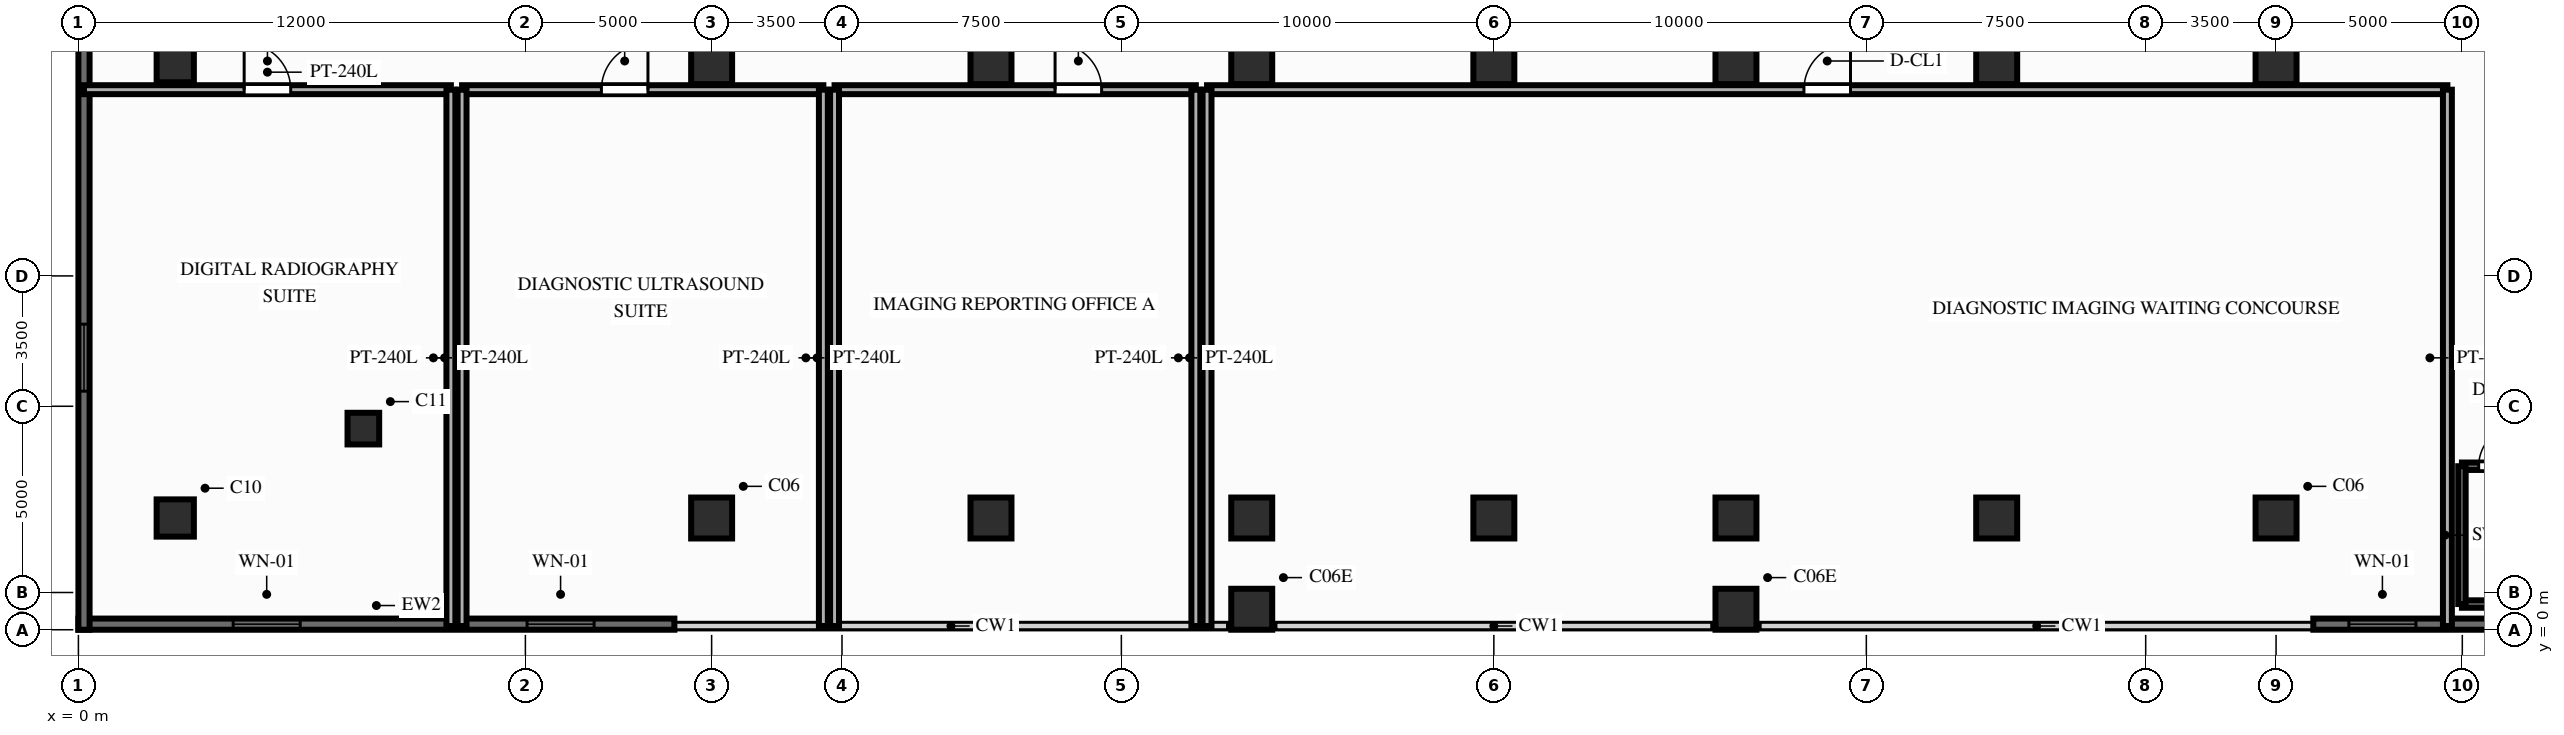
"""IFC4 building model, lengths in metres.
Left out: names, types, materials, properties, quantities, classifications, styles, units other than length and angle.
Written with IfcOpenShell. Run it as: python <this file> out.ifc"""

import sys

from ifc_helpers import new_model, si_unit, direction, frame, frame_2d, origin, origin_2d, place, context, subcontext, project, spatial, rectangle, circle, extrude, source, transform, mapped, element, fill, save


model = new_model("IFC4")
c1 = context("Model", 3, precision=1e-05, world=origin(), true_north=direction((0.0, 1.0)))
c2 = subcontext(c1, "Body", "Model", "MODEL_VIEW")
j1 = project(units=[si_unit("LENGTHUNIT", "METRE"), si_unit("PLANEANGLEUNIT", "RADIAN")], contexts=[c1])
p1 = place(None, origin())
s1 = spatial("IfcSite", under=j1, at=p1, CompositionType="ELEMENT")
p2 = place(p1, origin())
s2 = spatial("IfcBuilding", under=s1, at=p2, CompositionType="ELEMENT")
p3 = place(p2, frame((0.0, 0.0, 7.8)))
s3 = spatial("IfcBuildingStorey", under=s2, at=p3, CompositionType="ELEMENT", Elevation=7.8)
m1 = source(origin(), c2, "Body", "SweptSolid", [
    extrude(circle(Radius=0.5, at=origin_2d()), origin(), (0.0, 0.0, 1.0), 3.6),
])
for number, where, z_axis, x_axis in (
    (1, (2.6, 3.0, 0.0), (0.0, 0.0, 1.0), (1.0, 0.0, 0.0)),
    (2, (2.6, 15.2, 0.0), (0.0, 0.0, 1.0), (1.0, 0.0, 0.0)),
):
    element("IfcColumn", number, at=place(p3, frame(where, z_axis=z_axis, x_axis=x_axis)), inside=s3, PredefinedType="COLUMN", context=c2, shape_type="MappedRepresentation", body=[
        mapped(m1, transform((0.0, 0.0, 0.0), scale=1.0)),
    ])
m2 = source(origin(), c2, "Body", "SweptSolid", [
    extrude(circle(Radius=0.425, at=origin_2d()), origin(), (0.0, 0.0, 1.0), 3.6),
])
p4 = place(p3, frame((7.65, 5.4, 0.0), z_axis=(0.0, 0.0, 1.0), x_axis=(1.0, 0.0, 0.0)))
e3 = element("IfcColumn", 3, at=p4, inside=s3, PredefinedType="COLUMN", context=c2, shape_type="MappedRepresentation", body=[
    mapped(m2, transform((0.0, 0.0, 0.0), scale=1.0)),
])
m3 = source(origin(), c2, "Body", "SweptSolid", [
    extrude(rectangle(XDim=1.1, YDim=1.1, at=origin_2d()), origin(), (0.0, 0.0, 1.0), 3.6),
])
for number, where, z_axis, x_axis in (
    (4, (17.0, 3.0, 0.0), (0.0, 0.0, 1.0), (1.0, 0.0, 0.0)),
    (5, (59.0, 3.0, 0.0), (0.0, 0.0, 1.0), (1.0, 0.0, 0.0)),
    (6, (17.0, 15.2, 0.0), (0.0, 0.0, 1.0), (1.0, 0.0, 0.0)),
    (7, (59.0, 15.2, 0.0), (0.0, 0.0, 1.0), (1.0, 0.0, 0.0)),
    (8, (24.5, 3.0, 0.0), (0.0, 0.0, 1.0), (1.0, 0.0, 0.0)),
    (9, (24.5, 15.2, 0.0), (0.0, 0.0, 1.0), (1.0, 0.0, 0.0)),
    (10, (31.5, 0.55, 0.0), (0.0, 0.0, 1.0), (1.0, 0.0, 0.0)),
    (11, (31.5, 3.0, 0.0), (0.0, 0.0, 1.0), (1.0, 0.0, 0.0)),
    (12, (31.5, 15.2, 0.0), (0.0, 0.0, 1.0), (1.0, 0.0, 0.0)),
    (13, (38.0, 3.0, 0.0), (0.0, 0.0, 1.0), (1.0, 0.0, 0.0)),
    (14, (38.0, 15.2, 0.0), (0.0, 0.0, 1.0), (1.0, 0.0, 0.0)),
    (15, (44.5, 0.55, 0.0), (0.0, 0.0, 1.0), (1.0, 0.0, 0.0)),
    (16, (44.5, 3.0, 0.0), (0.0, 0.0, 1.0), (1.0, 0.0, 0.0)),
    (17, (44.5, 15.2, 0.0), (0.0, 0.0, 1.0), (1.0, 0.0, 0.0)),
    (18, (51.5, 3.0, 0.0), (0.0, 0.0, 1.0), (1.0, 0.0, 0.0)),
    (19, (51.5, 15.2, 0.0), (0.0, 0.0, 1.0), (1.0, 0.0, 0.0)),
):
    element("IfcColumn", number, at=place(p3, frame(where, z_axis=z_axis, x_axis=x_axis)), inside=s3, PredefinedType="COLUMN", context=c2, shape_type="MappedRepresentation", body=[
        mapped(m3, transform((0.0, 0.0, 0.0), scale=1.0)),
    ])
p5 = place(p3, frame((0.0, 0.15, 0.0), z_axis=(0.0, 0.0, 1.0), x_axis=(1.0, 0.0, 0.0)))
e20 = element("IfcWall", 20, at=p5, inside=s3, PredefinedType="SOLIDWALL", context=c2, shape_type="SweptSolid", body=[
    extrude(rectangle(XDim=16.0, YDim=0.3, at=frame_2d((8.0, 0.0))), origin(), (0.0, 0.0, 1.0), 2.88),
])
p6 = place(p5, frame((4.155, 0.0, 0.85)))
e21 = element("IfcOpeningElement", 21, at=p6, cuts=e20, PredefinedType="OPENING", context=c2, shape_type="SweptSolid", body=[
    extrude(rectangle(XDim=1.8, YDim=1.65, at=frame_2d((0.9, 0.825))), frame((0.0, 0.162, 0.0), z_axis=(0.0, -1.0, 0.0), x_axis=(1.0, 0.0, 0.0)), (0.0, 0.0, 1.0), 0.324),
])
p7 = place(p5, frame((12.045, 0.0, 0.85)))
e22 = element("IfcOpeningElement", 22, at=p7, cuts=e20, PredefinedType="OPENING", context=c2, shape_type="SweptSolid", body=[
    extrude(rectangle(XDim=1.8, YDim=1.65, at=frame_2d((0.9, 0.825))), frame((0.0, 0.162, 0.0), z_axis=(0.0, -1.0, 0.0), x_axis=(1.0, 0.0, 0.0)), (0.0, 0.0, 1.0), 0.324),
])
p8 = place(p3, frame((60.0, 0.15, 0.0), z_axis=(0.0, 0.0, 1.0), x_axis=(1.0, 0.0, 0.0)))
e23 = element("IfcWall", 23, at=p8, inside=s3, PredefinedType="SOLIDWALL", context=c2, shape_type="SweptSolid", body=[
    extrude(rectangle(XDim=16.0, YDim=0.3, at=frame_2d((8.0, 0.0))), origin(), (0.0, 0.0, 1.0), 2.88),
])
p9 = place(p8, frame((0.955, 0.0, 0.85)))
e24 = element("IfcOpeningElement", 24, at=p9, cuts=e23, PredefinedType="OPENING", context=c2, shape_type="SweptSolid", body=[
    extrude(rectangle(XDim=1.8, YDim=1.65, at=frame_2d((0.9, 0.825))), frame((0.0, 0.162, 0.0), z_axis=(0.0, -1.0, 0.0), x_axis=(1.0, 0.0, 0.0)), (0.0, 0.0, 1.0), 0.324),
])
p10 = place(p8, frame((6.705, 0.0, 0.85)))
e25 = element("IfcOpeningElement", 25, at=p10, cuts=e23, PredefinedType="OPENING", context=c2, shape_type="SweptSolid", body=[
    extrude(rectangle(XDim=1.8, YDim=1.65, at=frame_2d((0.9, 0.825))), frame((0.0, 0.162, 0.0), z_axis=(0.0, -1.0, 0.0), x_axis=(1.0, 0.0, 0.0)), (0.0, 0.0, 1.0), 0.324),
])
p11 = place(p8, frame((12.85, 0.0, 0.85)))
e26 = element("IfcOpeningElement", 26, at=p11, cuts=e23, PredefinedType="OPENING", context=c2, shape_type="SweptSolid", body=[
    extrude(rectangle(XDim=1.8, YDim=1.65, at=frame_2d((0.9, 0.825))), frame((0.0, 0.162, 0.0), z_axis=(0.0, -1.0, 0.0), x_axis=(1.0, 0.0, 0.0)), (0.0, 0.0, 1.0), 0.324),
])
p12 = place(p3, frame((0.15, 0.0, 0.0), z_axis=(0.0, 0.0, 1.0), x_axis=(0.0, 1.0, 0.0)))
e27 = element("IfcWall", 27, at=p12, inside=s3, PredefinedType="SOLIDWALL", context=c2, shape_type="SweptSolid", body=[
    extrude(rectangle(XDim=54.0, YDim=0.3, at=frame_2d((27.0, 0.0))), origin(), (0.0, 0.0, 1.0), 2.88),
])
p13 = place(p12, frame((6.405, 0.0, 0.85)))
e28 = element("IfcOpeningElement", 28, at=p13, cuts=e27, PredefinedType="OPENING", context=c2, shape_type="SweptSolid", body=[
    extrude(rectangle(XDim=1.8, YDim=1.65, at=frame_2d((0.9, 0.825))), frame((0.0, 0.162, 0.0), z_axis=(0.0, -1.0, 0.0), x_axis=(1.0, 0.0, 0.0)), (0.0, 0.0, 1.0), 0.324),
])
p14 = place(p12, frame((26.045, 0.0, 0.85)))
e29 = element("IfcOpeningElement", 29, at=p14, cuts=e27, PredefinedType="OPENING", context=c2, shape_type="SweptSolid", body=[
    extrude(rectangle(XDim=1.8, YDim=1.65, at=frame_2d((0.9, 0.825))), frame((0.0, 0.162, 0.0), z_axis=(0.0, -1.0, 0.0), x_axis=(1.0, 0.0, 0.0)), (0.0, 0.0, 1.0), 0.324),
])
p15 = place(p3, frame((63.99, 0.69, 0.0), z_axis=(0.0, 0.0, 1.0), x_axis=(1.0, 0.0, 0.0)))
e30 = element("IfcWall", 30, at=p15, inside=s3, PredefinedType="SOLIDWALL", context=c2, shape_type="SweptSolid", body=[
    extrude(rectangle(XDim=7.62, YDim=0.2, at=frame_2d((3.81, 0.0))), origin(), (0.0, 0.0, 1.0), 3.32),
])
p16 = place(p3, frame((63.99, 4.39, 0.0), z_axis=(0.0, 0.0, 1.0), x_axis=(1.0, 0.0, 0.0)))
e31 = element("IfcWall", 31, at=p16, inside=s3, PredefinedType="SOLIDWALL", context=c2, shape_type="SweptSolid", body=[
    extrude(rectangle(XDim=7.62, YDim=0.2, at=frame_2d((3.81, 0.0))), origin(), (0.0, 0.0, 1.0), 3.32),
])
p17 = place(p16, frame((0.45, 0.0, 0.0)))
e32 = element("IfcOpeningElement", 32, at=p17, cuts=e31, PredefinedType="OPENING", context=c2, shape_type="SweptSolid", body=[
    extrude(rectangle(XDim=1.1, YDim=2.15, at=frame_2d((0.55, 1.075))), frame((0.0, 0.112, 0.0), z_axis=(0.0, -1.0, 0.0), x_axis=(1.0, 0.0, 0.0)), (0.0, 0.0, 1.0), 0.224),
])
p18 = place(p3, frame((63.99, 0.69, 0.0), z_axis=(0.0, 0.0, 1.0), x_axis=(0.0, 1.0, 0.0)))
e33 = element("IfcWall", 33, at=p18, inside=s3, PredefinedType="SOLIDWALL", context=c2, shape_type="SweptSolid", body=[
    extrude(rectangle(XDim=3.7, YDim=0.2, at=frame_2d((1.85, 0.0))), origin(), (0.0, 0.0, 1.0), 3.32),
])
p19 = place(p3, frame((0.15, 14.5, 0.0), z_axis=(0.0, 0.0, 1.0), x_axis=(1.0, 0.0, 0.0)))
e34 = element("IfcWall", 34, at=p19, inside=s3, PredefinedType="PARTITIONING", context=c2, shape_type="SweptSolid", body=[
    extrude(rectangle(XDim=9.85, YDim=0.24, at=frame_2d((4.925, 0.0))), origin(), (0.0, 0.0, 1.0), 3.32),
])
p20 = place(p19, frame((4.3, 0.0, 0.0)))
e35 = element("IfcOpeningElement", 35, at=p20, cuts=e34, PredefinedType="OPENING", context=c2, shape_type="SweptSolid", body=[
    extrude(rectangle(XDim=1.25, YDim=2.15, at=frame_2d((0.625, 1.075))), frame((0.0, 0.132, 0.0), z_axis=(0.0, -1.0, 0.0), x_axis=(1.0, 0.0, 0.0)), (0.0, 0.0, 1.0), 0.264),
])
p21 = place(p3, frame((10.0, 0.1, 0.0), z_axis=(0.0, 0.0, 1.0), x_axis=(0.0, 1.0, 0.0)))
e36 = element("IfcWall", 36, at=p21, inside=s3, PredefinedType="PARTITIONING", context=c2, shape_type="SweptSolid", body=[
    extrude(rectangle(XDim=14.4, YDim=0.24, at=frame_2d((7.2, 0.0))), origin(), (0.0, 0.0, 1.0), 3.32),
])
p22 = place(p3, frame((10.3, 14.5, 0.0), z_axis=(0.0, 0.0, 1.0), x_axis=(1.0, 0.0, 0.0)))
e37 = element("IfcWall", 37, at=p22, inside=s3, PredefinedType="PARTITIONING", context=c2, shape_type="SweptSolid", body=[
    extrude(rectangle(XDim=9.7, YDim=0.24, at=frame_2d((4.85, 0.0))), origin(), (0.0, 0.0, 1.0), 3.32),
])
p23 = place(p22, frame((3.74, 0.0, 0.0)))
e38 = element("IfcOpeningElement", 38, at=p23, cuts=e37, PredefinedType="OPENING", context=c2, shape_type="SweptSolid", body=[
    extrude(rectangle(XDim=1.25, YDim=2.15, at=frame_2d((0.625, 1.075))), frame((0.0, 0.132, 0.0), z_axis=(0.0, -1.0, 0.0), x_axis=(1.0, 0.0, 0.0)), (0.0, 0.0, 1.0), 0.264),
])
for number, where, z_axis, x_axis in (
    (39, (10.3, 0.1, 0.0), (0.0, 0.0, 1.0), (0.0, 1.0, 0.0)),
    (40, (20.0, 0.1, 0.0), (0.0, 0.0, 1.0), (0.0, 1.0, 0.0)),
):
    element("IfcWall", number, at=place(p3, frame(where, z_axis=z_axis, x_axis=x_axis)), inside=s3, PredefinedType="PARTITIONING", context=c2, shape_type="SweptSolid", body=[
        extrude(rectangle(XDim=14.4, YDim=0.24, at=frame_2d((7.2, 0.0))), origin(), (0.0, 0.0, 1.0), 3.32),
    ])
p24 = place(p3, frame((20.3, 14.5, 0.0), z_axis=(0.0, 0.0, 1.0), x_axis=(1.0, 0.0, 0.0)))
e41 = element("IfcWall", 41, at=p24, inside=s3, PredefinedType="PARTITIONING", context=c2, shape_type="SweptSolid", body=[
    extrude(rectangle(XDim=9.7, YDim=0.24, at=frame_2d((4.85, 0.0))), origin(), (0.0, 0.0, 1.0), 3.32),
])
p25 = place(p24, frame((5.92, 0.0, 0.0)))
e42 = element("IfcOpeningElement", 42, at=p25, cuts=e41, PredefinedType="OPENING", context=c2, shape_type="SweptSolid", body=[
    extrude(rectangle(XDim=1.25, YDim=2.15, at=frame_2d((0.625, 1.075))), frame((0.0, 0.132, 0.0), z_axis=(0.0, -1.0, 0.0), x_axis=(1.0, 0.0, 0.0)), (0.0, 0.0, 1.0), 0.264),
])
for number, where, z_axis, x_axis in (
    (43, (20.3, 0.1, 0.0), (0.0, 0.0, 1.0), (0.0, 1.0, 0.0)),
    (44, (30.0, 0.1, 0.0), (0.0, 0.0, 1.0), (0.0, 1.0, 0.0)),
):
    element("IfcWall", number, at=place(p3, frame(where, z_axis=z_axis, x_axis=x_axis)), inside=s3, PredefinedType="PARTITIONING", context=c2, shape_type="SweptSolid", body=[
        extrude(rectangle(XDim=14.4, YDim=0.24, at=frame_2d((7.2, 0.0))), origin(), (0.0, 0.0, 1.0), 3.32),
    ])
p26 = place(p3, frame((30.3, 14.5, 0.0), z_axis=(0.0, 0.0, 1.0), x_axis=(1.0, 0.0, 0.0)))
e45 = element("IfcWall", 45, at=p26, inside=s3, PredefinedType="PARTITIONING", context=c2, shape_type="SweptSolid", body=[
    extrude(rectangle(XDim=33.3, YDim=0.24, at=frame_2d((16.65, 0.0))), origin(), (0.0, 0.0, 1.0), 3.32),
])
p27 = place(p26, frame((16.025, 0.0, 0.0)))
e46 = element("IfcOpeningElement", 46, at=p27, cuts=e45, PredefinedType="OPENING", context=c2, shape_type="SweptSolid", body=[
    extrude(rectangle(XDim=1.25, YDim=2.15, at=frame_2d((0.625, 1.075))), frame((0.0, 0.132, 0.0), z_axis=(0.0, -1.0, 0.0), x_axis=(1.0, 0.0, 0.0)), (0.0, 0.0, 1.0), 0.264),
])
for number, where, z_axis, x_axis in (
    (47, (30.3, 0.1, 0.0), (0.0, 0.0, 1.0), (0.0, 1.0, 0.0)),
    (48, (63.6, 0.1, 0.0), (0.0, 0.0, 1.0), (0.0, 1.0, 0.0)),
):
    element("IfcWall", number, at=place(p3, frame(where, z_axis=z_axis, x_axis=x_axis)), inside=s3, PredefinedType="PARTITIONING", context=c2, shape_type="SweptSolid", body=[
        extrude(rectangle(XDim=14.4, YDim=0.24, at=frame_2d((7.2, 0.0))), origin(), (0.0, 0.0, 1.0), 3.32),
    ])
m4 = source(origin(), c2, "Body", "SweptSolid", [
    extrude(rectangle(XDim=1.8, YDim=1.65, at=frame_2d((0.9, 0.825))), frame((0.0, 0.03, 0.0), z_axis=(0.0, -1.0, 0.0), x_axis=(1.0, 0.0, 0.0)), (0.0, 0.0, 1.0), 0.06),
])
p28 = place(p6, origin())
e49 = element("IfcWindow", 49, at=p28, inside=s3, PartitioningType="SINGLE_PANEL", PredefinedType="WINDOW", context=c2, shape_type="MappedRepresentation", body=[
    mapped(m4, transform((0.0, 0.0, 0.0), scale=1.0)),
])
fill(e21, e49)
p29 = place(p7, origin())
e50 = element("IfcWindow", 50, at=p29, inside=s3, PartitioningType="SINGLE_PANEL", PredefinedType="WINDOW", context=c2, shape_type="MappedRepresentation", body=[
    mapped(m4, transform((0.0, 0.0, 0.0), scale=1.0)),
])
fill(e22, e50)
p30 = place(p9, origin())
e51 = element("IfcWindow", 51, at=p30, inside=s3, PartitioningType="SINGLE_PANEL", PredefinedType="WINDOW", context=c2, shape_type="MappedRepresentation", body=[
    mapped(m4, transform((0.0, 0.0, 0.0), scale=1.0)),
])
fill(e24, e51)
p31 = place(p13, origin())
e52 = element("IfcWindow", 52, at=p31, inside=s3, PartitioningType="SINGLE_PANEL", PredefinedType="WINDOW", context=c2, shape_type="MappedRepresentation", body=[
    mapped(m4, transform((0.0, 0.0, 0.0), scale=1.0)),
])
fill(e28, e52)
m5 = source(origin(), c2, "Body", "SweptSolid", [
    extrude(rectangle(XDim=1.1, YDim=2.15, at=frame_2d((0.55, 1.075))), frame((0.0, 0.025, 0.0), z_axis=(0.0, -1.0, 0.0), x_axis=(1.0, 0.0, 0.0)), (0.0, 0.0, 1.0), 0.05),
])
p32 = place(p17, origin())
e53 = element("IfcDoor", 53, at=p32, inside=s3, OperationType="SINGLE_SWING_RIGHT", PredefinedType="DOOR", context=c2, shape_type="MappedRepresentation", body=[
    mapped(m5, transform((0.0, 0.0, 0.0), scale=1.0)),
])
fill(e32, e53)
m6 = source(origin(), c2, "Body", "SweptSolid", [
    extrude(rectangle(XDim=1.25, YDim=2.15, at=frame_2d((0.625, 1.075))), frame((0.0, 0.025, 0.0), z_axis=(0.0, -1.0, 0.0), x_axis=(1.0, 0.0, 0.0)), (0.0, 0.0, 1.0), 0.05),
])
p33 = place(p20, origin())
e54 = element("IfcDoor", 54, at=p33, inside=s3, OperationType="SINGLE_SWING_LEFT", PredefinedType="DOOR", context=c2, shape_type="MappedRepresentation", body=[
    mapped(m6, transform((0.0, 0.0, 0.0), scale=1.0)),
])
fill(e35, e54)
p34 = place(p23, origin())
e55 = element("IfcDoor", 55, at=p34, inside=s3, OperationType="SINGLE_SWING_RIGHT", PredefinedType="DOOR", context=c2, shape_type="MappedRepresentation", body=[
    mapped(m6, transform((0.0, 0.0, 0.0), scale=1.0)),
])
fill(e38, e55)
p35 = place(p25, origin())
e56 = element("IfcDoor", 56, at=p35, inside=s3, OperationType="SINGLE_SWING_LEFT", PredefinedType="DOOR", context=c2, shape_type="MappedRepresentation", body=[
    mapped(m6, transform((0.0, 0.0, 0.0), scale=1.0)),
])
fill(e42, e56)
p36 = place(p27, origin())
e57 = element("IfcDoor", 57, at=p36, inside=s3, OperationType="SINGLE_SWING_RIGHT", PredefinedType="DOOR", context=c2, shape_type="MappedRepresentation", body=[
    mapped(m6, transform((0.0, 0.0, 0.0), scale=1.0)),
])
fill(e46, e57)
save(model, sys.argv[1])
